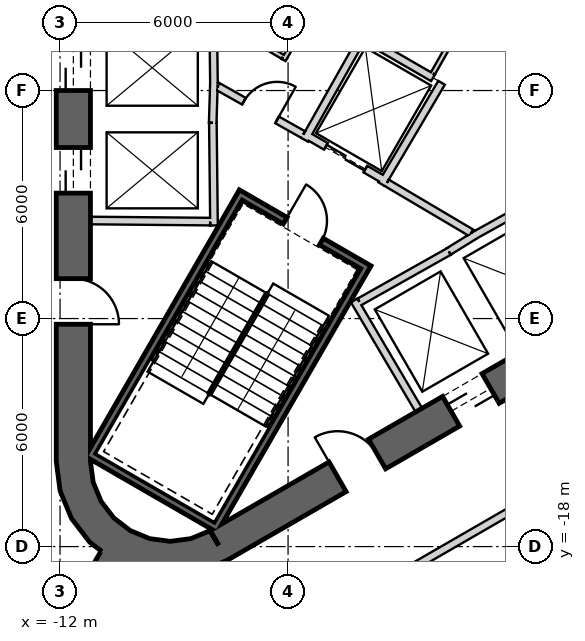
"""IFC4 building model, lengths in metres.
Left out: names, types, materials, properties, quantities, classifications, styles, units other than length and angle.
Written with IfcOpenShell. Run it as: python <this file> out.ifc"""

import sys

from ifc_helpers import new_model, si_unit, direction, frame, frame_2d, origin, place, context, subcontext, project, spatial, polyline, rectangle, outline, extrude, element, fill, save


model = new_model("IFC4")
c1 = context("Model", 3, precision=1e-05, world=origin(), true_north=direction((0.0, 1.0)))
c2 = subcontext(c1, "Body", "Model", "MODEL_VIEW")
j1 = project(units=[si_unit("LENGTHUNIT", "METRE"), si_unit("PLANEANGLEUNIT", "RADIAN")], contexts=[c1])
p1 = place(None, origin())
s1 = spatial("IfcSite", under=j1, at=p1, CompositionType="ELEMENT")
p2 = place(p1, origin())
s2 = spatial("IfcBuilding", under=s1, at=p2, CompositionType="ELEMENT")
p3 = place(p2, frame((0.0, 0.0, 94.7)))
s3 = spatial("IfcBuildingStorey", under=s2, at=p3, CompositionType="ELEMENT", Elevation=94.7)
p4 = place(p3, frame((-11.65, 15.762, 0.0), z_axis=(0.0, 0.0, 1.0), x_axis=(0.0, -1.0, 0.0)))
e1 = element("IfcWall", 1, at=p4, inside=s3, PredefinedType="SHEAR", context=c2, shape_type="SweptSolid", body=[
    extrude(rectangle(XDim=31.523, YDim=0.9, at=frame_2d((15.762, 0.0))), origin(), (0.0, 0.0, 1.0), 4.1),
])
p5 = place(p4, frame((7.062, 0.0, 0.0)))
e2 = element("IfcOpeningElement", 2, at=p5, cuts=e1, PredefinedType="OPENING", context=c2, shape_type="SweptSolid", body=[
    extrude(rectangle(XDim=1.2, YDim=2.4, at=frame_2d((0.6, 1.2))), frame((0.0, 0.46, 0.0), z_axis=(0.0, -1.0, 0.0), x_axis=(1.0, 0.0, 0.0)), (0.0, 0.0, 1.0), 0.92),
])
p6 = place(p4, frame((9.762, 0.0, 0.0)))
e3 = element("IfcOpeningElement", 3, at=p6, cuts=e1, PredefinedType="OPENING", context=c2, shape_type="SweptSolid", body=[
    extrude(rectangle(XDim=1.2, YDim=2.4, at=frame_2d((0.6, 1.2))), frame((0.0, 0.46, 0.0), z_axis=(0.0, -1.0, 0.0), x_axis=(1.0, 0.0, 0.0)), (0.0, 0.0, 1.0), 0.92),
])
p7 = place(p4, frame((12.462, 0.0, 0.0)))
e4 = element("IfcOpeningElement", 4, at=p7, cuts=e1, PredefinedType="OPENING", context=c2, shape_type="SweptSolid", body=[
    extrude(rectangle(XDim=1.2, YDim=2.4, at=frame_2d((0.6, 1.2))), frame((0.0, 0.46, 0.0), z_axis=(0.0, -1.0, 0.0), x_axis=(1.0, 0.0, 0.0)), (0.0, 0.0, 1.0), 0.92),
])
p8 = place(p4, frame((15.162, 0.0, 0.0)))
e5 = element("IfcOpeningElement", 5, at=p8, cuts=e1, PredefinedType="OPENING", context=c2, shape_type="SweptSolid", body=[
    extrude(rectangle(XDim=1.2, YDim=2.4, at=frame_2d((0.6, 1.2))), frame((0.0, 0.46, 0.0), z_axis=(0.0, -1.0, 0.0), x_axis=(1.0, 0.0, 0.0)), (0.0, 0.0, 1.0), 0.92),
])
p9 = place(p4, frame((17.862, 0.0, 0.0)))
e6 = element("IfcOpeningElement", 6, at=p9, cuts=e1, PredefinedType="OPENING", context=c2, shape_type="SweptSolid", body=[
    extrude(rectangle(XDim=1.2, YDim=2.4, at=frame_2d((0.6, 1.2))), frame((0.0, 0.46, 0.0), z_axis=(0.0, -1.0, 0.0), x_axis=(1.0, 0.0, 0.0)), (0.0, 0.0, 1.0), 0.92),
])
p10 = place(p4, frame((20.562, 0.0, 0.0)))
e7 = element("IfcOpeningElement", 7, at=p10, cuts=e1, PredefinedType="OPENING", context=c2, shape_type="SweptSolid", body=[
    extrude(rectangle(XDim=1.2, YDim=2.4, at=frame_2d((0.6, 1.2))), frame((0.0, 0.46, 0.0), z_axis=(0.0, -1.0, 0.0), x_axis=(1.0, 0.0, 0.0)), (0.0, 0.0, 1.0), 0.92),
])
p11 = place(p4, frame((23.262, 0.0, 0.0)))
e8 = element("IfcOpeningElement", 8, at=p11, cuts=e1, PredefinedType="OPENING", context=c2, shape_type="SweptSolid", body=[
    extrude(rectangle(XDim=1.2, YDim=2.4, at=frame_2d((0.6, 1.2))), frame((0.0, 0.46, 0.0), z_axis=(0.0, -1.0, 0.0), x_axis=(1.0, 0.0, 0.0)), (0.0, 0.0, 1.0), 0.92),
])
p12 = place(p4, frame((3.612, 0.0, 0.0)))
e9 = element("IfcOpeningElement", 9, at=p12, cuts=e1, PredefinedType="OPENING", context=c2, shape_type="SweptSolid", body=[
    extrude(rectangle(XDim=1.2, YDim=2.4, at=frame_2d((0.6, 1.2))), frame((0.0, 0.46, 0.0), z_axis=(0.0, -1.0, 0.0), x_axis=(1.0, 0.0, 0.0)), (0.0, 0.0, 1.0), 0.92),
])
p13 = place(p4, frame((26.712, 0.0, 0.0)))
e10 = element("IfcOpeningElement", 10, at=p13, cuts=e1, PredefinedType="OPENING", context=c2, shape_type="SweptSolid", body=[
    extrude(rectangle(XDim=1.2, YDim=2.4, at=frame_2d((0.6, 1.2))), frame((0.0, 0.46, 0.0), z_axis=(0.0, -1.0, 0.0), x_axis=(1.0, 0.0, 0.0)), (0.0, 0.0, 1.0), 0.92),
])
p14 = place(p3, frame((-7.825, -17.97, 0.0), z_axis=(0.0, 0.0, 1.0), x_axis=(0.866028369851, 0.499994862586, 0.0)))
e11 = element("IfcWall", 11, at=p14, inside=s3, PredefinedType="SHEAR", context=c2, shape_type="SweptSolid", body=[
    extrude(rectangle(XDim=31.523, YDim=0.9, at=frame_2d((15.762, 0.0))), origin(), (0.0, 0.0, 1.0), 4.1),
])
p15 = place(p14, frame((7.062, 0.0, 0.0)))
e12 = element("IfcOpeningElement", 12, at=p15, cuts=e11, PredefinedType="OPENING", context=c2, shape_type="SweptSolid", body=[
    extrude(rectangle(XDim=1.2, YDim=2.4, at=frame_2d((0.6, 1.2))), frame((0.0, 0.46, 0.0), z_axis=(0.0, -1.0, 0.0), x_axis=(1.0, 0.0, 0.0)), (0.0, 0.0, 1.0), 0.92),
])
p16 = place(p14, frame((9.762, 0.0, 0.0)))
e13 = element("IfcOpeningElement", 13, at=p16, cuts=e11, PredefinedType="OPENING", context=c2, shape_type="SweptSolid", body=[
    extrude(rectangle(XDim=1.2, YDim=2.4, at=frame_2d((0.6, 1.2))), frame((0.0, 0.46, 0.0), z_axis=(0.0, -1.0, 0.0), x_axis=(1.0, 0.0, 0.0)), (0.0, 0.0, 1.0), 0.92),
])
p17 = place(p14, frame((12.462, 0.0, 0.0)))
e14 = element("IfcOpeningElement", 14, at=p17, cuts=e11, PredefinedType="OPENING", context=c2, shape_type="SweptSolid", body=[
    extrude(rectangle(XDim=1.2, YDim=2.4, at=frame_2d((0.6, 1.2))), frame((0.0, 0.46, 0.0), z_axis=(0.0, -1.0, 0.0), x_axis=(1.0, 0.0, 0.0)), (0.0, 0.0, 1.0), 0.92),
])
p18 = place(p14, frame((15.162, 0.0, 0.0)))
e15 = element("IfcOpeningElement", 15, at=p18, cuts=e11, PredefinedType="OPENING", context=c2, shape_type="SweptSolid", body=[
    extrude(rectangle(XDim=1.2, YDim=2.4, at=frame_2d((0.6, 1.2))), frame((0.0, 0.46, 0.0), z_axis=(0.0, -1.0, 0.0), x_axis=(1.0, 0.0, 0.0)), (0.0, 0.0, 1.0), 0.92),
])
p19 = place(p14, frame((17.862, 0.0, 0.0)))
e16 = element("IfcOpeningElement", 16, at=p19, cuts=e11, PredefinedType="OPENING", context=c2, shape_type="SweptSolid", body=[
    extrude(rectangle(XDim=1.2, YDim=2.4, at=frame_2d((0.6, 1.2))), frame((0.0, 0.46, 0.0), z_axis=(0.0, -1.0, 0.0), x_axis=(1.0, 0.0, 0.0)), (0.0, 0.0, 1.0), 0.92),
])
p20 = place(p14, frame((20.562, 0.0, 0.0)))
e17 = element("IfcOpeningElement", 17, at=p20, cuts=e11, PredefinedType="OPENING", context=c2, shape_type="SweptSolid", body=[
    extrude(rectangle(XDim=1.2, YDim=2.4, at=frame_2d((0.6, 1.2))), frame((0.0, 0.46, 0.0), z_axis=(0.0, -1.0, 0.0), x_axis=(1.0, 0.0, 0.0)), (0.0, 0.0, 1.0), 0.92),
])
p21 = place(p14, frame((26.712, 0.0, 0.0)))
e18 = element("IfcOpeningElement", 18, at=p21, cuts=e11, PredefinedType="OPENING", context=c2, shape_type="SweptSolid", body=[
    extrude(rectangle(XDim=1.2, YDim=2.4, at=frame_2d((0.6, 1.2))), frame((0.0, 0.46, 0.0), z_axis=(0.0, -1.0, 0.0), x_axis=(1.0, 0.0, 0.0)), (0.0, 0.0, 1.0), 0.92),
])
p22 = place(p14, frame((3.612, 0.0, 0.0)))
e19 = element("IfcOpeningElement", 19, at=p22, cuts=e11, PredefinedType="OPENING", context=c2, shape_type="SweptSolid", body=[
    extrude(rectangle(XDim=1.2, YDim=2.4, at=frame_2d((0.6, 1.2))), frame((0.0, 0.46, 0.0), z_axis=(0.0, -1.0, 0.0), x_axis=(1.0, 0.0, 0.0)), (0.0, 0.0, 1.0), 0.92),
])
p23 = place(p3, origin())
e20 = element("IfcWall", 20, at=p23, inside=s3, PredefinedType="SHEAR", context=c2, shape_type="SweptSolid", body=[
    extrude(outline(polyline([(-12.1, -15.762), (-11.998, -16.538), (-11.698, -17.262), (-11.221, -17.883), (-10.6, -18.36), (-9.876, -18.659), (-9.1, -18.762), (-8.323, -18.659), (-7.6, -18.36), (-8.05, -17.58), (-8.556, -17.79), (-9.1, -17.862), (-9.644, -17.79), (-10.15, -17.58), (-10.585, -17.247), (-10.919, -16.812), (-11.128, -16.305), (-11.2, -15.762), (-12.1, -15.762)])), origin(), (0.0, 0.0, 1.0), 4.1),
])
p24 = place(p3, frame((-10.575, -18.316, 0.0), z_axis=(0.0, 0.0, 1.0), x_axis=(-0.500006018292, -0.866021929094, 0.0)))
e21 = element("IfcWall", 21, at=p24, inside=s3, PredefinedType="SHEAR", context=c2, shape_type="SweptSolid", body=[
    extrude(rectangle(XDim=13.241, YDim=0.8, at=frame_2d((6.621, 0.0))), origin(), (0.0, 0.0, 1.0), 4.1),
])
p25 = place(p24, frame((6.35, 0.0, 0.0)))
e22 = element("IfcOpeningElement", 22, at=p25, cuts=e21, PredefinedType="OPENING", context=c2, shape_type="SweptSolid", body=[
    extrude(rectangle(XDim=1.4, YDim=2.4, at=frame_2d((0.7, 1.2))), frame((0.0, 0.41, 0.0), z_axis=(0.0, -1.0, 0.0), x_axis=(1.0, 0.0, 0.0)), (0.0, 0.0, 1.0), 0.82),
])
p26 = place(p3, frame((-7.95, -5.772, 0.0), z_axis=(0.0, 0.0, 1.0), x_axis=(-0.030803413295, -0.999525462272, 0.0)))
e23 = element("IfcWall", 23, at=p26, inside=s3, PredefinedType="PLUMBINGWALL", context=c2, shape_type="SweptSolid", body=[
    extrude(rectangle(XDim=1.078, YDim=0.2, at=frame_2d((0.539, 0.0))), origin(), (0.0, 0.0, 1.0), 3.8),
])
p27 = place(p3, frame((-7.971, -4.05, 0.0), z_axis=(0.0, 0.0, 1.0), x_axis=(0.012042535896, -0.999927486035, 0.0)))
e24 = element("IfcWall", 24, at=p27, inside=s3, PredefinedType="PLUMBINGWALL", context=c2, shape_type="SweptSolid", body=[
    extrude(rectangle(XDim=1.845, YDim=0.2, at=frame_2d((0.922, 0.0))), origin(), (0.0, 0.0, 1.0), 3.8),
])
p28 = place(p3, frame((-7.979, -6.85, 0.0), z_axis=(0.0, 0.0, 1.0), x_axis=(0.011121475088, -0.999938154483, 0.0)))
e25 = element("IfcWall", 25, at=p28, inside=s3, PredefinedType="PLUMBINGWALL", context=c2, shape_type="SweptSolid", body=[
    extrude(rectangle(XDim=2.7, YDim=0.2, at=frame_2d((1.35, 0.0))), origin(), (0.0, 0.0, 1.0), 3.8),
])
p29 = place(p3, frame((-8.05, -9.449, 0.0), z_axis=(0.0, 0.0, 1.0), x_axis=(-0.999957467379, 0.009222983926, 0.0)))
e26 = element("IfcWall", 26, at=p29, inside=s3, PredefinedType="PLUMBINGWALL", context=c2, shape_type="SweptSolid", body=[
    extrude(rectangle(XDim=3.15, YDim=0.2, at=frame_2d((1.575, 0.0))), origin(), (0.0, 0.0, 1.0), 3.8),
])
p30 = place(p3, frame((-2.558, -14.409, 0.0), z_axis=(0.0, 0.0, 1.0), x_axis=(-0.507997497166, 0.861358544901, 0.0)))
e27 = element("IfcWall", 27, at=p30, inside=s3, PredefinedType="PLUMBINGWALL", context=c2, shape_type="SweptSolid", body=[
    extrude(rectangle(XDim=3.35, YDim=0.2, at=frame_2d((1.675, 0.0))), origin(), (0.0, 0.0, 1.0), 3.8),
])
p31 = place(p3, frame((-1.769, -10.237, 0.0), z_axis=(0.0, 0.0, 1.0), x_axis=(-0.871534483978, -0.490334215854, 0.0)))
e28 = element("IfcWall", 28, at=p31, inside=s3, PredefinedType="PLUMBINGWALL", context=c2, shape_type="SweptSolid", body=[
    extrude(rectangle(XDim=2.7, YDim=0.2, at=frame_2d((1.35, 0.0))), origin(), (0.0, 0.0, 1.0), 3.8),
])
p32 = place(p3, frame((-1.024, -9.771, 0.0), z_axis=(0.0, 0.0, 1.0), x_axis=(-0.850348075135, -0.526220629693, 0.0)))
e29 = element("IfcWall", 29, at=p32, inside=s3, PredefinedType="PLUMBINGWALL", context=c2, shape_type="SweptSolid", body=[
    extrude(rectangle(XDim=0.878, YDim=0.2, at=frame_2d((0.439, 0.0))), origin(), (0.0, 0.0, 1.0), 3.8),
])
p33 = place(p3, frame((-1.13, -9.831, 0.0), z_axis=(0.0, 0.0, 1.0), x_axis=(0.874269620932, 0.485440655401, 0.0)))
e30 = element("IfcWall", 30, at=p33, inside=s3, PredefinedType="PLUMBINGWALL", context=c2, shape_type="SweptSolid", body=[
    extrude(rectangle(XDim=1.845, YDim=0.2, at=frame_2d((0.922, 0.0))), origin(), (0.0, 0.0, 1.0), 3.8),
])
p34 = place(p3, frame((-3.905, -10.563, -0.3), z_axis=(0.0, 0.0, 1.0), x_axis=(-0.500012932018, -0.866017937352, 0.0)))
e31 = element("IfcWall", 31, at=p34, inside=s3, PredefinedType="SHEAR", context=c2, shape_type="SweptSolid", body=[
    extrude(rectangle(XDim=8.1, YDim=0.2, at=frame_2d((4.05, 0.0))), origin(), (0.0, 0.0, 1.0), 4.1),
])
p35 = place(p3, frame((-11.282, -15.541, -0.3), z_axis=(0.0, 0.0, 1.0), x_axis=(0.866000483506, -0.500043160704, 0.0)))
e32 = element("IfcWall", 32, at=p35, inside=s3, PredefinedType="SHEAR", context=c2, shape_type="SweptSolid", body=[
    extrude(rectangle(XDim=3.8, YDim=0.2, at=frame_2d((1.9, 0.0))), origin(), (0.0, 0.0, 1.0), 4.1),
])
p36 = place(p3, frame((-7.196, -8.663, -0.3), z_axis=(0.0, 0.0, 1.0), x_axis=(-0.499997992926, -0.866026562566, 0.0)))
e33 = element("IfcWall", 33, at=p36, inside=s3, PredefinedType="SHEAR", context=c2, shape_type="SweptSolid", body=[
    extrude(rectangle(XDim=7.9, YDim=0.2, at=frame_2d((3.95, 0.0))), origin(), (0.0, 0.0, 1.0), 4.1),
])
p37 = place(p3, frame((-4.041, -10.599, -0.3), z_axis=(0.0, 0.0, 1.0), x_axis=(-0.866047807691, 0.499961193289, 0.0)))
e34 = element("IfcWall", 34, at=p37, inside=s3, PredefinedType="SHEAR", context=c2, shape_type="SweptSolid", body=[
    extrude(rectangle(XDim=3.6, YDim=0.2, at=frame_2d((1.8, 0.0))), origin(), (0.0, 0.0, 1.0), 4.1),
])
p38 = place(p37, frame((1.25, 0.0, 0.3)))
e35 = element("IfcOpeningElement", 35, at=p38, cuts=e34, PredefinedType="OPENING", context=c2, shape_type="SweptSolid", body=[
    extrude(rectangle(XDim=1.1, YDim=2.1, at=frame_2d((0.55, 1.05))), frame((0.0, 0.11, 0.0), z_axis=(0.0, -1.0, 0.0), x_axis=(1.0, 0.0, 0.0)), (0.0, 0.0, 1.0), 0.22),
])
p39 = place(p3, frame((-3.446, -8.368, 0.0), z_axis=(0.0, 0.0, 1.0), x_axis=(-0.866024647952, 0.500001309137, 0.0)))
e36 = element("IfcWall", 36, at=p39, inside=s3, PredefinedType="PLUMBINGWALL", context=c2, shape_type="SweptSolid", body=[
    extrude(rectangle(XDim=2.4, YDim=0.2, at=frame_2d((1.2, 0.0))), origin(), (0.0, 0.0, 1.0), 3.8),
])
p40 = place(p39, frame((0.6, 0.0, 0.0)))
e37 = element("IfcOpeningElement", 37, at=p40, cuts=e36, PredefinedType="OPENING", context=c2, shape_type="SweptSolid", body=[
    extrude(rectangle(XDim=1.2, YDim=2.4, at=frame_2d((0.6, 1.2))), frame((0.0, 0.11, 0.0), z_axis=(0.0, -1.0, 0.0), x_axis=(1.0, 0.0, 0.0)), (0.0, 0.0, 1.0), 0.22),
])
p41 = place(p3, frame((-1.961, -5.796, 0.0), z_axis=(0.0, 0.0, 1.0), x_axis=(-0.508647062354, -0.860975125052, 0.0)))
e38 = element("IfcWall", 38, at=p41, inside=s3, PredefinedType="PLUMBINGWALL", context=c2, shape_type="SweptSolid", body=[
    extrude(rectangle(XDim=3.1, YDim=0.2, at=frame_2d((1.55, 0.0))), origin(), (0.0, 0.0, 1.0), 3.8),
])
p42 = place(p3, frame((-3.99, -4.509, 0.0), z_axis=(0.0, 0.0, 1.0), x_axis=(-0.491358283181, -0.870957540612, 0.0)))
e39 = element("IfcWall", 39, at=p42, inside=s3, PredefinedType="PLUMBINGWALL", context=c2, shape_type="SweptSolid", body=[
    extrude(rectangle(XDim=3.2, YDim=0.2, at=frame_2d((1.6, 0.0))), origin(), (0.0, 0.0, 1.0), 3.8),
])
p43 = place(p3, frame((-3.953, -4.646, 0.0), z_axis=(0.0, 0.0, 1.0), x_axis=(0.866032100247, -0.499988401207, 0.0)))
e40 = element("IfcWall", 40, at=p43, inside=s3, PredefinedType="PLUMBINGWALL", context=c2, shape_type="SweptSolid", body=[
    extrude(rectangle(XDim=2.04, YDim=0.2, at=frame_2d((1.02, 0.0))), origin(), (0.0, 0.0, 1.0), 3.8),
])
p44 = place(p3, frame((-3.401, -8.43, 0.0), z_axis=(0.0, 0.0, 1.0), x_axis=(0.860615607571, -0.509255118781, 0.0)))
e41 = element("IfcWall", 41, at=p44, inside=s3, PredefinedType="PARTITIONING", context=c2, shape_type="SweptSolid", body=[
    extrude(rectangle(XDim=2.581, YDim=0.2, at=frame_2d((1.29, 0.0))), origin(), (0.0, 0.0, 1.0), 3.8),
])
p45 = place(p3, frame((-7.849, -5.894, 0.0), z_axis=(0.0, 0.0, 1.0), x_axis=(0.871363259478, -0.490638431059, 0.0)))
e42 = element("IfcWall", 42, at=p45, inside=s3, PredefinedType="PARTITIONING", context=c2, shape_type="SweptSolid", body=[
    extrude(rectangle(XDim=2.581, YDim=0.2, at=frame_2d((1.291, 0.0))), origin(), (0.0, 0.0, 1.0), 3.8),
])
p46 = place(p45, frame((0.791, 0.0, 0.0)))
e43 = element("IfcOpeningElement", 43, at=p46, cuts=e42, PredefinedType="OPENING", context=c2, shape_type="SweptSolid", body=[
    extrude(rectangle(XDim=1.0, YDim=2.1, at=frame_2d((0.5, 1.05))), frame((0.0, 0.11, 0.0), z_axis=(0.0, -1.0, 0.0), x_axis=(1.0, 0.0, 0.0)), (0.0, 0.0, 1.0), 0.22),
])
p47 = place(p3, frame((0.051, -1.611, 0.0), z_axis=(0.0, 0.0, 1.0), x_axis=(-0.49434454467, -0.869266053148, 0.0)))
e44 = element("IfcWall", 44, at=p47, inside=s3, PredefinedType="PARTITIONING", context=c2, shape_type="SweptSolid", body=[
    extrude(rectangle(XDim=4.53, YDim=0.12, at=frame_2d((2.265, 0.0))), origin(), (0.0, 0.0, 1.0), 3.8),
])
p48 = place(p47, frame((1.916, 0.0, 0.0)))
e45 = element("IfcOpeningElement", 45, at=p48, cuts=e44, PredefinedType="OPENING", context=c2, shape_type="SweptSolid", body=[
    extrude(rectangle(XDim=0.8, YDim=2.1, at=frame_2d((0.4, 1.05))), frame((0.0, 0.07, 0.0), z_axis=(0.0, -1.0, 0.0), x_axis=(1.0, 0.0, 0.0)), (0.0, 0.0, 1.0), 0.14),
])
p49 = place(p3, frame((-6.118, -5.197, 0.0), z_axis=(0.0, 0.0, 1.0), x_axis=(0.499990139034, 0.866031096941, 0.0)))
e46 = element("IfcWall", 46, at=p49, inside=s3, PredefinedType="PARTITIONING", context=c2, shape_type="SweptSolid", body=[
    extrude(rectangle(XDim=3.0, YDim=0.12, at=frame_2d((1.5, 0.0))), origin(), (0.0, 0.0, 1.0), 3.8),
])
p50 = place(p3, frame((-7.95, -4.041, 0.0), z_axis=(0.0, 0.0, 1.0), x_axis=(0.860112457103, -0.510104461004, 0.0)))
e47 = element("IfcWall", 47, at=p50, inside=s3, PredefinedType="PARTITIONING", context=c2, shape_type="SweptSolid", body=[
    extrude(rectangle(XDim=2.104, YDim=0.12, at=frame_2d((1.052, 0.0))), origin(), (0.0, 0.0, 1.0), 3.8),
])
p51 = place(p3, frame((-3.072, -18.747, 0.0), z_axis=(0.0, 0.0, 1.0), x_axis=(0.866027760718, 0.499995917648, 0.0)))
e48 = element("IfcWall", 48, at=p51, inside=s3, PredefinedType="PARTITIONING", context=c2, shape_type="SweptSolid", body=[
    extrude(rectangle(XDim=28.233, YDim=0.2, at=frame_2d((14.117, 0.0))), origin(), (0.0, 0.0, 1.0), 2.98),
])
p52 = place(p51, frame((13.617, 0.0, 0.0)))
e49 = element("IfcOpeningElement", 49, at=p52, cuts=e48, PredefinedType="OPENING", context=c2, shape_type="SweptSolid", body=[
    extrude(rectangle(XDim=1.0, YDim=2.1, at=frame_2d((0.5, 1.05))), frame((0.0, 0.11, 0.0), z_axis=(0.0, -1.0, 0.0), x_axis=(1.0, 0.0, 0.0)), (0.0, 0.0, 1.0), 0.22),
])
p53 = place(p38, origin())
e50 = element("IfcDoor", 50, at=p53, inside=s3, OperationType="SINGLE_SWING_LEFT", PredefinedType="USERDEFINED", context=c2, shape_type="SweptSolid", body=[
    extrude(rectangle(XDim=1.1, YDim=2.1, at=frame_2d((0.55, 1.05))), frame((0.0, 0.025, 0.0), z_axis=(0.0, -1.0, 0.0), x_axis=(1.0, 0.0, 0.0)), (0.0, 0.0, 1.0), 0.05),
])
fill(e35, e50)
p54 = place(p46, origin())
e51 = element("IfcDoor", 51, at=p54, inside=s3, OperationType="SINGLE_SWING_LEFT", PredefinedType="USERDEFINED", context=c2, shape_type="SweptSolid", body=[
    extrude(rectangle(XDim=1.0, YDim=2.1, at=frame_2d((0.5, 1.05))), frame((0.0, 0.025, 0.0), z_axis=(0.0, -1.0, 0.0), x_axis=(1.0, 0.0, 0.0)), (0.0, 0.0, 1.0), 0.05),
])
fill(e43, e51)
p55 = place(p40, origin())
e52 = element("IfcDoor", 52, at=p55, inside=s3, OperationType="SLIDING_TO_LEFT", PredefinedType="USERDEFINED", context=c2, shape_type="SweptSolid", body=[
    extrude(rectangle(XDim=1.2, YDim=2.4, at=frame_2d((0.6, 1.2))), frame((0.0, 0.025, 0.0), z_axis=(0.0, -1.0, 0.0), x_axis=(1.0, 0.0, 0.0)), (0.0, 0.0, 1.0), 0.05),
])
fill(e37, e52)
p56 = place(p10, origin())
e53 = element("IfcDoor", 53, at=p56, inside=s3, OperationType="SLIDING_TO_LEFT", PredefinedType="USERDEFINED", context=c2, shape_type="SweptSolid", body=[
    extrude(rectangle(XDim=1.2, YDim=2.4, at=frame_2d((0.6, 1.2))), frame((0.0, 0.025, 0.0), z_axis=(0.0, -1.0, 0.0), x_axis=(1.0, 0.0, 0.0)), (0.0, 0.0, 1.0), 0.05),
])
fill(e7, e53)
p57 = place(p11, origin())
e54 = element("IfcDoor", 54, at=p57, inside=s3, OperationType="SLIDING_TO_LEFT", PredefinedType="USERDEFINED", context=c2, shape_type="SweptSolid", body=[
    extrude(rectangle(XDim=1.2, YDim=2.4, at=frame_2d((0.6, 1.2))), frame((0.0, 0.025, 0.0), z_axis=(0.0, -1.0, 0.0), x_axis=(1.0, 0.0, 0.0)), (0.0, 0.0, 1.0), 0.05),
])
fill(e8, e54)
p58 = place(p15, origin())
e55 = element("IfcDoor", 55, at=p58, inside=s3, OperationType="SLIDING_TO_LEFT", PredefinedType="USERDEFINED", context=c2, shape_type="SweptSolid", body=[
    extrude(rectangle(XDim=1.2, YDim=2.4, at=frame_2d((0.6, 1.2))), frame((0.0, 0.025, 0.0), z_axis=(0.0, -1.0, 0.0), x_axis=(1.0, 0.0, 0.0)), (0.0, 0.0, 1.0), 0.05),
])
fill(e12, e55)
p59 = place(p13, origin())
e56 = element("IfcDoor", 56, at=p59, inside=s3, OperationType="SINGLE_SWING_RIGHT", PredefinedType="USERDEFINED", context=c2, shape_type="SweptSolid", body=[
    extrude(rectangle(XDim=1.2, YDim=2.4, at=frame_2d((0.6, 1.2))), frame((0.0, 0.025, 0.0), z_axis=(0.0, -1.0, 0.0), x_axis=(1.0, 0.0, 0.0)), (0.0, 0.0, 1.0), 0.05),
])
fill(e10, e56)
p60 = place(p22, origin())
e57 = element("IfcDoor", 57, at=p60, inside=s3, OperationType="SINGLE_SWING_LEFT", PredefinedType="USERDEFINED", context=c2, shape_type="SweptSolid", body=[
    extrude(rectangle(XDim=1.2, YDim=2.4, at=frame_2d((0.6, 1.2))), frame((0.0, 0.025, 0.0), z_axis=(0.0, -1.0, 0.0), x_axis=(1.0, 0.0, 0.0)), (0.0, 0.0, 1.0), 0.05),
])
fill(e19, e57)
save(model, sys.argv[1])
